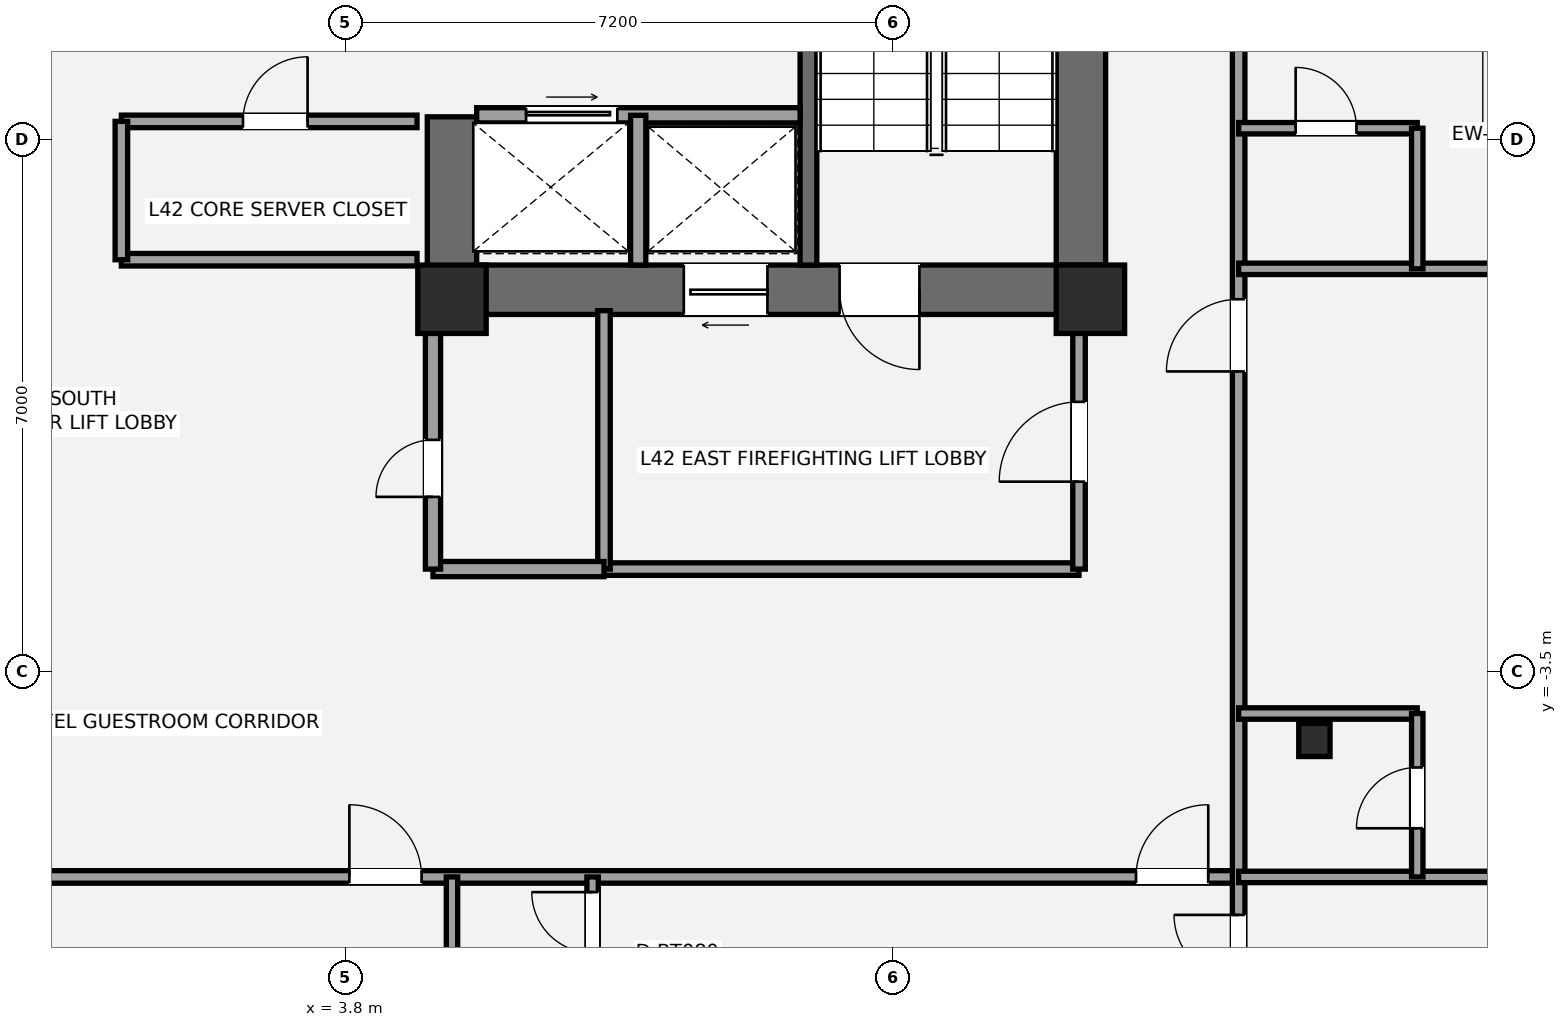
"""IFC4 building model, lengths in metres.
Left out: names, types, materials, properties, quantities, classifications, styles, units other than length and angle.
Written with IfcOpenShell. Run it as: python <this file> out.ifc"""

import sys

from ifc_helpers import new_model, si_unit, direction, frame, frame_2d, origin, origin_2d, place, context, subcontext, project, spatial, rectangle, i_section, extrude, element, fill, save


model = new_model("IFC4")
c1 = context("Model", 3, precision=1e-05, world=origin(), true_north=direction((0.0, 1.0)))
c2 = subcontext(c1, "Body", "Model", "MODEL_VIEW")
j1 = project(units=[si_unit("LENGTHUNIT", "METRE"), si_unit("PLANEANGLEUNIT", "RADIAN")], contexts=[c1])
p1 = place(None, origin())
s1 = spatial("IfcSite", under=j1, at=p1, CompositionType="ELEMENT")
p2 = place(p1, origin())
s2 = spatial("IfcBuilding", under=s1, at=p2, CompositionType="ELEMENT")
p3 = place(p2, frame((0.0, 0.0, 156.6)))
s3 = spatial("IfcBuildingStorey", under=s2, at=p3, CompositionType="ELEMENT", Elevation=156.6)
p4 = place(p3, frame((13.475, 1.2, 0.0), z_axis=(0.0, 0.0, 1.0), x_axis=(0.0, 1.0, 0.0)))
e1 = element("IfcWall", 1, at=p4, inside=s3, PredefinedType="SHEAR", context=c2, shape_type="SweptSolid", body=[
    extrude(rectangle(XDim=8.45, YDim=0.65, at=frame_2d((4.225, 0.0))), origin(), (0.0, 0.0, 1.0), 3.2),
])
p5 = place(p3, frame((13.8, 1.525, 0.0), z_axis=(0.0, 0.0, 1.0), x_axis=(-1.0, 0.0, 0.0)))
e2 = element("IfcWall", 2, at=p5, inside=s3, PredefinedType="SHEAR", context=c2, shape_type="SweptSolid", body=[
    extrude(rectangle(XDim=8.925, YDim=0.65, at=frame_2d((4.462, 0.0))), origin(), (0.0, 0.0, 1.0), 3.2),
])
p6 = place(p5, frame((2.45, 0.0, 0.0)))
e3 = element("IfcOpeningElement", 3, at=p6, cuts=e2, PredefinedType="OPENING", context=c2, shape_type="SweptSolid", body=[
    extrude(rectangle(XDim=1.05, YDim=2.15, at=frame_2d((0.525, 1.075))), frame((0.0, 0.335, 0.0), z_axis=(0.0, -1.0, 0.0), x_axis=(1.0, 0.0, 0.0)), (0.0, 0.0, 1.0), 0.67),
])
p7 = place(p5, frame((4.45, 0.0, 0.0)))
e4 = element("IfcOpeningElement", 4, at=p7, cuts=e2, PredefinedType="OPENING", context=c2, shape_type="SweptSolid", body=[
    extrude(rectangle(XDim=1.1, YDim=2.2, at=frame_2d((0.55, 1.1))), frame((0.0, 0.335, 0.0), z_axis=(0.0, -1.0, 0.0), x_axis=(1.0, 0.0, 0.0)), (0.0, 0.0, 1.0), 0.67),
])
p8 = place(p3, frame((5.2, 1.2, 0.0), z_axis=(0.0, 0.0, 1.0), x_axis=(0.0, 1.0, 0.0)))
e5 = element("IfcWall", 5, at=p8, inside=s3, PredefinedType="SHEAR", context=c2, shape_type="SweptSolid", body=[
    extrude(rectangle(XDim=2.6, YDim=0.65, at=frame_2d((1.3, 0.0))), origin(), (0.0, 0.0, 1.0), 3.2),
])
p9 = place(p3, frame((9.89, 1.85, 0.0), z_axis=(0.0, 0.0, 1.0), x_axis=(0.0, 1.0, 0.0)))
e6 = element("IfcWall", 6, at=p9, inside=s3, PredefinedType="SHEAR", context=c2, shape_type="SweptSolid", body=[
    extrude(rectangle(XDim=7.15, YDim=0.22, at=frame_2d((3.575, 0.0))), origin(), (0.0, 0.0, 1.0), 3.2),
])
for number, where, z_axis, x_axis in (
    (7, (5.2, 1.4, 0.0), (0.0, 0.0, 1.0), (1.0, 0.0, 0.0)),
    (8, (13.6, 1.4, 0.0), (0.0, 0.0, 1.0), (1.0, 0.0, 0.0)),
):
    element("IfcColumn", number, at=place(p3, frame(where, z_axis=z_axis, x_axis=x_axis)), inside=s3, PredefinedType="COLUMN", context=c2, shape_type="SweptSolid", body=[
        extrude(rectangle(XDim=0.9, YDim=0.9, at=origin_2d()), origin(), (0.0, 0.0, 1.0), 3.2),
    ])
p10 = place(p3, frame((16.547, -4.398, 0.0), z_axis=(0.0, 0.0, 1.0), x_axis=(1.0, 0.0, 0.0)))
e9 = element("IfcColumn", 9, at=p10, inside=s3, PredefinedType="COLUMN", context=c2, shape_type="SweptSolid", body=[
    extrude(i_section(OverallWidth=0.412, OverallDepth=0.435, WebThickness=0.036, FlangeThickness=0.057, at=origin_2d()), origin(), (0.0, 0.0, 1.0), 3.2),
])
p11 = place(p3, frame((18.778, 6.766, 0.0), z_axis=(0.0, 0.0, 1.0), x_axis=(0.487244227645, -0.873265745708, 0.0)))
e10 = element("IfcWall", 10, at=p11, inside=s3, PredefinedType="STANDARD", context=c2, shape_type="SweptSolid", body=[
    extrude(rectangle(XDim=3.053, YDim=0.44, at=frame_2d((1.527, 0.0))), origin(), (0.0, 0.0, 1.0), 2.319),
])
p12 = place(p11, frame((0.977, 0.0, 0.0)))
e11 = element("IfcOpeningElement", 11, at=p12, cuts=e10, PredefinedType="OPENING", context=c2, shape_type="SweptSolid", body=[
    extrude(rectangle(XDim=1.1, YDim=2.15, at=frame_2d((0.55, 1.075))), frame((0.0, 0.23, 0.0), z_axis=(0.0, -1.0, 0.0), x_axis=(1.0, 0.0, 0.0)), (0.0, 0.0, 1.0), 0.46),
])
p13 = place(p3, frame((7.2, -2.15, 0.0), z_axis=(0.0, 0.0, 1.0), x_axis=(1.0, 0.0, 0.0)))
e12 = element("IfcWall", 12, at=p13, inside=s3, PredefinedType="PARTITIONING", context=c2, shape_type="SweptSolid", body=[
    extrude(rectangle(XDim=6.25, YDim=0.165, at=frame_2d((3.125, 0.0))), origin(), (0.0, 0.0, 1.0), 3.02),
])
p14 = place(p3, frame((7.2, -2.15, 0.0), z_axis=(0.0, 0.0, 1.0), x_axis=(0.0, 1.0, 0.0)))
e13 = element("IfcWall", 13, at=p14, inside=s3, PredefinedType="PARTITIONING", context=c2, shape_type="SweptSolid", body=[
    extrude(rectangle(XDim=3.4, YDim=0.165, at=frame_2d((1.7, 0.0))), origin(), (0.0, 0.0, 1.0), 2.473),
])
p15 = place(p3, frame((13.45, -2.15, 0.0), z_axis=(0.0, 0.0, 1.0), x_axis=(0.0, 1.0, 0.0)))
e14 = element("IfcWall", 14, at=p15, inside=s3, PredefinedType="PARTITIONING", context=c2, shape_type="SweptSolid", body=[
    extrude(rectangle(XDim=3.4, YDim=0.165, at=frame_2d((1.7, 0.0))), origin(), (0.0, 0.0, 1.0), 3.02),
])
p16 = place(p15, frame((1.15, 0.0, 0.0)))
e15 = element("IfcOpeningElement", 15, at=p16, cuts=e14, PredefinedType="OPENING", context=c2, shape_type="SweptSolid", body=[
    extrude(rectangle(XDim=1.05, YDim=2.15, at=frame_2d((0.525, 1.075))), frame((0.0, 0.093, 0.0), z_axis=(0.0, -1.0, 0.0), x_axis=(1.0, 0.0, 0.0)), (0.0, 0.0, 1.0), 0.185),
])
p17 = place(p3, frame((4.95, -2.15, 0.0), z_axis=(0.0, 0.0, 1.0), x_axis=(1.0, 0.0, 0.0)))
e16 = element("IfcWall", 16, at=p17, inside=s3, PredefinedType="SOLIDWALL", context=c2, shape_type="SweptSolid", body=[
    extrude(rectangle(XDim=2.25, YDim=0.2, at=frame_2d((1.125, 0.0))), origin(), (0.0, 0.0, 1.0), 3.02),
])
p18 = place(p3, frame((4.95, -2.15, 0.0), z_axis=(0.0, 0.0, 1.0), x_axis=(0.0, 1.0, 0.0)))
e17 = element("IfcWall", 17, at=p18, inside=s3, PredefinedType="SOLIDWALL", context=c2, shape_type="SweptSolid", body=[
    extrude(rectangle(XDim=3.4, YDim=0.2, at=frame_2d((1.7, 0.0))), origin(), (0.0, 0.0, 1.0), 2.473),
])
p19 = place(p18, frame((0.95, 0.0, 0.0)))
e18 = element("IfcOpeningElement", 18, at=p19, cuts=e17, PredefinedType="OPENING", context=c2, shape_type="SweptSolid", body=[
    extrude(rectangle(XDim=0.75, YDim=2.1, at=frame_2d((0.375, 1.05))), frame((0.0, 0.11, 0.0), z_axis=(0.0, -1.0, 0.0), x_axis=(1.0, 0.0, 0.0)), (0.0, 0.0, 1.0), 0.22),
])
p20 = place(p3, frame((5.525, 3.82, 0.0), z_axis=(0.0, 0.0, 1.0), x_axis=(1.0, 0.0, 0.0)))
e19 = element("IfcWall", 19, at=p20, inside=s3, PredefinedType="SOLIDWALL", context=c2, shape_type="SweptSolid", body=[
    extrude(rectangle(XDim=4.255, YDim=0.2, at=frame_2d((2.127, 0.0))), origin(), (0.0, 0.0, 1.0), 3.02),
])
p21 = place(p20, frame((0.65, 0.0, 0.0)))
e20 = element("IfcOpeningElement", 20, at=p21, cuts=e19, PredefinedType="OPENING", context=c2, shape_type="SweptSolid", body=[
    extrude(rectangle(XDim=1.2, YDim=2.2, at=frame_2d((0.6, 1.1))), frame((0.0, 0.11, 0.0), z_axis=(0.0, -1.0, 0.0), x_axis=(1.0, 0.0, 0.0)), (0.0, 0.0, 1.0), 0.22),
])
p22 = place(p3, frame((7.65, 1.85, 0.0), z_axis=(0.0, 0.0, 1.0), x_axis=(0.0, 1.0, 0.0)))
e21 = element("IfcWall", 21, at=p22, inside=s3, PredefinedType="SOLIDWALL", context=c2, shape_type="SweptSolid", body=[
    extrude(rectangle(XDim=1.97, YDim=0.2, at=frame_2d((0.985, 0.0))), origin(), (0.0, 0.0, 1.0), 3.02),
])
p23 = place(p3, frame((0.85, 1.92, 0.0), z_axis=(0.0, 0.0, 1.0), x_axis=(1.0, 0.0, 0.0)))
e22 = element("IfcWall", 22, at=p23, inside=s3, PredefinedType="PARTITIONING", context=c2, shape_type="SweptSolid", body=[
    extrude(rectangle(XDim=3.89, YDim=0.165, at=frame_2d((1.945, 0.0))), origin(), (0.0, 0.0, 1.0), 2.16),
])
p24 = place(p3, frame((0.85, 3.74, 0.0), z_axis=(0.0, 0.0, 1.0), x_axis=(1.0, 0.0, 0.0)))
e23 = element("IfcWall", 23, at=p24, inside=s3, PredefinedType="PARTITIONING", context=c2, shape_type="SweptSolid", body=[
    extrude(rectangle(XDim=3.89, YDim=0.165, at=frame_2d((1.945, 0.0))), origin(), (0.0, 0.0, 1.0), 3.02),
])
p25 = place(p24, frame((1.6, 0.0, 0.0)))
e24 = element("IfcOpeningElement", 24, at=p25, cuts=e23, PredefinedType="OPENING", context=c2, shape_type="SweptSolid", body=[
    extrude(rectangle(XDim=0.85, YDim=2.1, at=frame_2d((0.425, 1.05))), frame((0.0, 0.093, 0.0), z_axis=(0.0, -1.0, 0.0), x_axis=(1.0, 0.0, 0.0)), (0.0, 0.0, 1.0), 0.185),
])
p26 = place(p3, frame((0.85, 1.92, 0.0), z_axis=(0.0, 0.0, 1.0), x_axis=(0.0, 1.0, 0.0)))
e25 = element("IfcWall", 25, at=p26, inside=s3, PredefinedType="PARTITIONING", context=c2, shape_type="SweptSolid", body=[
    extrude(rectangle(XDim=1.82, YDim=0.165, at=frame_2d((0.91, 0.0))), origin(), (0.0, 0.0, 1.0), 3.02),
])
p27 = place(p3, frame((-15.75, -6.2, 0.0), z_axis=(0.0, 0.0, 1.0), x_axis=(1.0, 0.0, 0.0)))
e26 = element("IfcWall", 26, at=p27, inside=s3, PredefinedType="PARTITIONING", context=c2, shape_type="SweptSolid", body=[
    extrude(rectangle(XDim=31.3, YDim=0.165, at=frame_2d((15.65, 0.0))), origin(), (0.0, 0.0, 1.0), 2.398),
])
p28 = place(p27, frame((8.12, 0.0, 0.0)))
e27 = element("IfcOpeningElement", 27, at=p28, cuts=e26, PredefinedType="OPENING", context=c2, shape_type="SweptSolid", body=[
    extrude(rectangle(XDim=0.95, YDim=2.15, at=frame_2d((0.475, 1.075))), frame((0.0, 0.093, 0.0), z_axis=(0.0, -1.0, 0.0), x_axis=(1.0, 0.0, 0.0)), (0.0, 0.0, 1.0), 0.185),
])
p29 = place(p27, frame((19.6, 0.0, 0.0)))
e28 = element("IfcOpeningElement", 28, at=p29, cuts=e26, PredefinedType="OPENING", context=c2, shape_type="SweptSolid", body=[
    extrude(rectangle(XDim=0.95, YDim=2.15, at=frame_2d((0.475, 1.075))), frame((0.0, 0.093, 0.0), z_axis=(0.0, -1.0, 0.0), x_axis=(1.0, 0.0, 0.0)), (0.0, 0.0, 1.0), 0.185),
])
p30 = place(p27, frame((29.95, 0.0, 0.0)))
e29 = element("IfcOpeningElement", 29, at=p30, cuts=e26, PredefinedType="OPENING", context=c2, shape_type="SweptSolid", body=[
    extrude(rectangle(XDim=0.95, YDim=2.15, at=frame_2d((0.475, 1.075))), frame((0.0, 0.093, 0.0), z_axis=(0.0, -1.0, 0.0), x_axis=(1.0, 0.0, 0.0)), (0.0, 0.0, 1.0), 0.185),
])
p31 = place(p3, frame((15.55, -13.191, 0.0), z_axis=(0.0, 0.0, 1.0), x_axis=(0.0, 1.0, 0.0)))
e30 = element("IfcWall", 30, at=p31, inside=s3, PredefinedType="PARTITIONING", context=c2, shape_type="SweptSolid", body=[
    extrude(rectangle(XDim=20.741, YDim=0.165, at=frame_2d((10.37, 0.0))), origin(), (0.0, 0.0, 1.0), 2.473),
])
p32 = place(p31, frame((5.641, 0.0, 0.0)))
e31 = element("IfcOpeningElement", 31, at=p32, cuts=e30, PredefinedType="OPENING", context=c2, shape_type="SweptSolid", body=[
    extrude(rectangle(XDim=0.85, YDim=2.1, at=frame_2d((0.425, 1.05))), frame((0.0, 0.093, 0.0), z_axis=(0.0, -1.0, 0.0), x_axis=(1.0, 0.0, 0.0)), (0.0, 0.0, 1.0), 0.185),
])
p33 = place(p31, frame((13.641, 0.0, 0.0)))
e32 = element("IfcOpeningElement", 32, at=p33, cuts=e30, PredefinedType="OPENING", context=c2, shape_type="SweptSolid", body=[
    extrude(rectangle(XDim=0.95, YDim=2.15, at=frame_2d((0.475, 1.075))), frame((0.0, 0.093, 0.0), z_axis=(0.0, -1.0, 0.0), x_axis=(1.0, 0.0, 0.0)), (0.0, 0.0, 1.0), 0.185),
])
p34 = place(p31, frame((19.391, 0.0, 0.0)))
e33 = element("IfcOpeningElement", 33, at=p34, cuts=e30, PredefinedType="OPENING", context=c2, shape_type="SweptSolid", body=[
    extrude(rectangle(XDim=0.95, YDim=2.15, at=frame_2d((0.475, 1.075))), frame((0.0, 0.093, 0.0), z_axis=(0.0, -1.0, 0.0), x_axis=(1.0, 0.0, 0.0)), (0.0, 0.0, 1.0), 0.185),
])
p35 = place(p3, frame((15.55, -6.2, 0.0), z_axis=(0.0, 0.0, 1.0), x_axis=(1.0, 0.0, 0.0)))
e34 = element("IfcWall", 34, at=p35, inside=s3, PredefinedType="PLUMBINGWALL", context=c2, shape_type="SweptSolid", body=[
    extrude(rectangle(XDim=7.278, YDim=0.15, at=frame_2d((3.639, 0.0))), origin(), (0.0, 0.0, 1.0), 2.473),
])
p36 = place(p3, frame((5.2, -16.022, 0.0), z_axis=(0.0, 0.0, 1.0), x_axis=(0.0, 1.0, 0.0)))
e35 = element("IfcWall", 35, at=p36, inside=s3, PredefinedType="PLUMBINGWALL", context=c2, shape_type="SweptSolid", body=[
    extrude(rectangle(XDim=9.822, YDim=0.15, at=frame_2d((4.911, 0.0))), origin(), (0.0, 0.0, 1.0), 2.473),
])
p37 = place(p3, frame((7.05, -8.35, 0.0), z_axis=(0.0, 0.0, 1.0), x_axis=(0.0, 1.0, 0.0)))
e36 = element("IfcWall", 36, at=p37, inside=s3, PredefinedType="PLUMBINGWALL", context=c2, shape_type="SweptSolid", body=[
    extrude(rectangle(XDim=2.15, YDim=0.15, at=frame_2d((1.075, 0.0))), origin(), (0.0, 0.0, 1.0), 3.02),
])
p38 = place(p37, frame((1.15, 0.0, 0.0)))
e37 = element("IfcOpeningElement", 37, at=p38, cuts=e36, PredefinedType="OPENING", context=c2, shape_type="SweptSolid", body=[
    extrude(rectangle(XDim=0.8, YDim=2.1, at=frame_2d((0.4, 1.05))), frame((0.0, 0.085, 0.0), z_axis=(0.0, -1.0, 0.0), x_axis=(1.0, 0.0, 0.0)), (0.0, 0.0, 1.0), 0.17),
])
p39 = place(p3, frame((15.55, 1.8, 0.0), z_axis=(0.0, 0.0, 1.0), x_axis=(1.0, 0.0, 0.0)))
e38 = element("IfcWall", 38, at=p39, inside=s3, PredefinedType="PLUMBINGWALL", context=c2, shape_type="SweptSolid", body=[
    extrude(rectangle(XDim=5.025, YDim=0.15, at=frame_2d((2.512, 0.0))), origin(), (0.0, 0.0, 1.0), 2.473),
])
p40 = place(p3, frame((15.55, -4.05, 0.0), z_axis=(0.0, 0.0, 1.0), x_axis=(1.0, 0.0, 0.0)))
e39 = element("IfcWall", 39, at=p40, inside=s3, PredefinedType="PLUMBINGWALL", context=c2, shape_type="SweptSolid", body=[
    extrude(rectangle(XDim=2.35, YDim=0.15, at=frame_2d((1.175, 0.0))), origin(), (0.0, 0.0, 1.0), 2.398),
])
p41 = place(p3, frame((17.9, -6.2, 0.0), z_axis=(0.0, 0.0, 1.0), x_axis=(0.0, 1.0, 0.0)))
e40 = element("IfcWall", 40, at=p41, inside=s3, PredefinedType="PLUMBINGWALL", context=c2, shape_type="SweptSolid", body=[
    extrude(rectangle(XDim=2.15, YDim=0.15, at=frame_2d((1.075, 0.0))), origin(), (0.0, 0.0, 1.0), 3.02),
])
p42 = place(p41, frame((0.64, 0.0, 0.0)))
e41 = element("IfcOpeningElement", 41, at=p42, cuts=e40, PredefinedType="OPENING", context=c2, shape_type="SweptSolid", body=[
    extrude(rectangle(XDim=0.8, YDim=2.1, at=frame_2d((0.4, 1.05))), frame((0.0, 0.085, 0.0), z_axis=(0.0, -1.0, 0.0), x_axis=(1.0, 0.0, 0.0)), (0.0, 0.0, 1.0), 0.17),
])
p43 = place(p3, frame((15.55, 3.65, 0.0), z_axis=(0.0, 0.0, 1.0), x_axis=(1.0, 0.0, 0.0)))
e42 = element("IfcWall", 42, at=p43, inside=s3, PredefinedType="PLUMBINGWALL", context=c2, shape_type="SweptSolid", body=[
    extrude(rectangle(XDim=2.35, YDim=0.15, at=frame_2d((1.175, 0.0))), origin(), (0.0, 0.0, 1.0), 3.02),
])
p44 = place(p43, frame((0.75, 0.0, 0.0)))
e43 = element("IfcOpeningElement", 43, at=p44, cuts=e42, PredefinedType="OPENING", context=c2, shape_type="SweptSolid", body=[
    extrude(rectangle(XDim=0.8, YDim=2.1, at=frame_2d((0.4, 1.05))), frame((0.0, 0.085, 0.0), z_axis=(0.0, -1.0, 0.0), x_axis=(1.0, 0.0, 0.0)), (0.0, 0.0, 1.0), 0.17),
])
p45 = place(p3, frame((17.9, 1.8, 0.0), z_axis=(0.0, 0.0, 1.0), x_axis=(0.0, 1.0, 0.0)))
e44 = element("IfcWall", 44, at=p45, inside=s3, PredefinedType="PLUMBINGWALL", context=c2, shape_type="SweptSolid", body=[
    extrude(rectangle(XDim=1.85, YDim=0.15, at=frame_2d((0.925, 0.0))), origin(), (0.0, 0.0, 1.0), 2.473),
])
p46 = place(p6, origin())
e45 = element("IfcDoor", 45, at=p46, inside=s3, OperationType="SINGLE_SWING_LEFT", PredefinedType="DOOR", context=c2, shape_type="SweptSolid", body=[
    extrude(rectangle(XDim=1.05, YDim=2.15, at=frame_2d((0.525, 1.075))), frame((0.0, 0.025, 0.0), z_axis=(0.0, -1.0, 0.0), x_axis=(1.0, 0.0, 0.0)), (0.0, 0.0, 1.0), 0.05),
])
fill(e3, e45)
p47 = place(p16, origin())
e46 = element("IfcDoor", 46, at=p47, inside=s3, OperationType="SINGLE_SWING_LEFT", PredefinedType="DOOR", context=c2, shape_type="SweptSolid", body=[
    extrude(rectangle(XDim=1.05, YDim=2.15, at=frame_2d((0.525, 1.075))), frame((0.0, 0.025, 0.0), z_axis=(0.0, -1.0, 0.0), x_axis=(1.0, 0.0, 0.0)), (0.0, 0.0, 1.0), 0.05),
])
fill(e15, e46)
p48 = place(p19, origin())
e47 = element("IfcDoor", 47, at=p48, inside=s3, OperationType="SINGLE_SWING_LEFT", PredefinedType="DOOR", context=c2, shape_type="SweptSolid", body=[
    extrude(rectangle(XDim=0.75, YDim=2.1, at=frame_2d((0.375, 1.05))), frame((0.0, 0.025, 0.0), z_axis=(0.0, -1.0, 0.0), x_axis=(1.0, 0.0, 0.0)), (0.0, 0.0, 1.0), 0.05),
])
fill(e18, e47)
p49 = place(p7, origin())
e48 = element("IfcDoor", 48, at=p49, inside=s3, OperationType="SLIDING_TO_LEFT", PredefinedType="DOOR", context=c2, shape_type="SweptSolid", body=[
    extrude(rectangle(XDim=1.1, YDim=2.2, at=frame_2d((0.55, 1.1))), frame((0.0, 0.025, 0.0), z_axis=(0.0, -1.0, 0.0), x_axis=(1.0, 0.0, 0.0)), (0.0, 0.0, 1.0), 0.05),
])
fill(e4, e48)
p50 = place(p21, origin())
e49 = element("IfcDoor", 49, at=p50, inside=s3, OperationType="SLIDING_TO_RIGHT", PredefinedType="DOOR", context=c2, shape_type="SweptSolid", body=[
    extrude(rectangle(XDim=1.2, YDim=2.2, at=frame_2d((0.6, 1.1))), frame((0.0, 0.025, 0.0), z_axis=(0.0, -1.0, 0.0), x_axis=(1.0, 0.0, 0.0)), (0.0, 0.0, 1.0), 0.05),
])
fill(e20, e49)
p51 = place(p25, origin())
e50 = element("IfcDoor", 50, at=p51, inside=s3, OperationType="SINGLE_SWING_RIGHT", PredefinedType="DOOR", context=c2, shape_type="SweptSolid", body=[
    extrude(rectangle(XDim=0.85, YDim=2.1, at=frame_2d((0.425, 1.05))), frame((0.0, 0.025, 0.0), z_axis=(0.0, -1.0, 0.0), x_axis=(1.0, 0.0, 0.0)), (0.0, 0.0, 1.0), 0.05),
])
fill(e24, e50)
p52 = place(p32, origin())
e51 = element("IfcDoor", 51, at=p52, inside=s3, OperationType="SINGLE_SWING_RIGHT", PredefinedType="DOOR", context=c2, shape_type="SweptSolid", body=[
    extrude(rectangle(XDim=0.85, YDim=2.1, at=frame_2d((0.425, 1.05))), frame((0.0, 0.025, 0.0), z_axis=(0.0, -1.0, 0.0), x_axis=(1.0, 0.0, 0.0)), (0.0, 0.0, 1.0), 0.05),
])
fill(e31, e51)
p53 = place(p29, origin())
e52 = element("IfcDoor", 52, at=p53, inside=s3, OperationType="SINGLE_SWING_LEFT", PredefinedType="DOOR", context=c2, shape_type="SweptSolid", body=[
    extrude(rectangle(XDim=0.95, YDim=2.15, at=frame_2d((0.475, 1.075))), frame((0.0, 0.025, 0.0), z_axis=(0.0, -1.0, 0.0), x_axis=(1.0, 0.0, 0.0)), (0.0, 0.0, 1.0), 0.05),
])
fill(e28, e52)
p54 = place(p30, origin())
e53 = element("IfcDoor", 53, at=p54, inside=s3, OperationType="SINGLE_SWING_RIGHT", PredefinedType="DOOR", context=c2, shape_type="SweptSolid", body=[
    extrude(rectangle(XDim=0.95, YDim=2.15, at=frame_2d((0.475, 1.075))), frame((0.0, 0.025, 0.0), z_axis=(0.0, -1.0, 0.0), x_axis=(1.0, 0.0, 0.0)), (0.0, 0.0, 1.0), 0.05),
])
fill(e29, e53)
p55 = place(p38, origin())
e54 = element("IfcDoor", 54, at=p55, inside=s3, OperationType="SINGLE_SWING_RIGHT", PredefinedType="DOOR", context=c2, shape_type="SweptSolid", body=[
    extrude(rectangle(XDim=0.8, YDim=2.1, at=frame_2d((0.4, 1.05))), frame((0.0, 0.025, 0.0), z_axis=(0.0, -1.0, 0.0), x_axis=(1.0, 0.0, 0.0)), (0.0, 0.0, 1.0), 0.05),
])
fill(e37, e54)
p56 = place(p33, origin())
e55 = element("IfcDoor", 55, at=p56, inside=s3, OperationType="SINGLE_SWING_LEFT", PredefinedType="DOOR", context=c2, shape_type="SweptSolid", body=[
    extrude(rectangle(XDim=0.95, YDim=2.15, at=frame_2d((0.475, 1.075))), frame((0.0, 0.025, 0.0), z_axis=(0.0, -1.0, 0.0), x_axis=(1.0, 0.0, 0.0)), (0.0, 0.0, 1.0), 0.05),
])
fill(e32, e55)
p57 = place(p42, origin())
e56 = element("IfcDoor", 56, at=p57, inside=s3, OperationType="SINGLE_SWING_LEFT", PredefinedType="DOOR", context=c2, shape_type="SweptSolid", body=[
    extrude(rectangle(XDim=0.8, YDim=2.1, at=frame_2d((0.4, 1.05))), frame((0.0, 0.025, 0.0), z_axis=(0.0, -1.0, 0.0), x_axis=(1.0, 0.0, 0.0)), (0.0, 0.0, 1.0), 0.05),
])
fill(e41, e56)
p58 = place(p44, origin())
e57 = element("IfcDoor", 57, at=p58, inside=s3, OperationType="SINGLE_SWING_LEFT", PredefinedType="DOOR", context=c2, shape_type="SweptSolid", body=[
    extrude(rectangle(XDim=0.8, YDim=2.1, at=frame_2d((0.4, 1.05))), frame((0.0, 0.025, 0.0), z_axis=(0.0, -1.0, 0.0), x_axis=(1.0, 0.0, 0.0)), (0.0, 0.0, 1.0), 0.05),
])
fill(e43, e57)
save(model, sys.argv[1])
